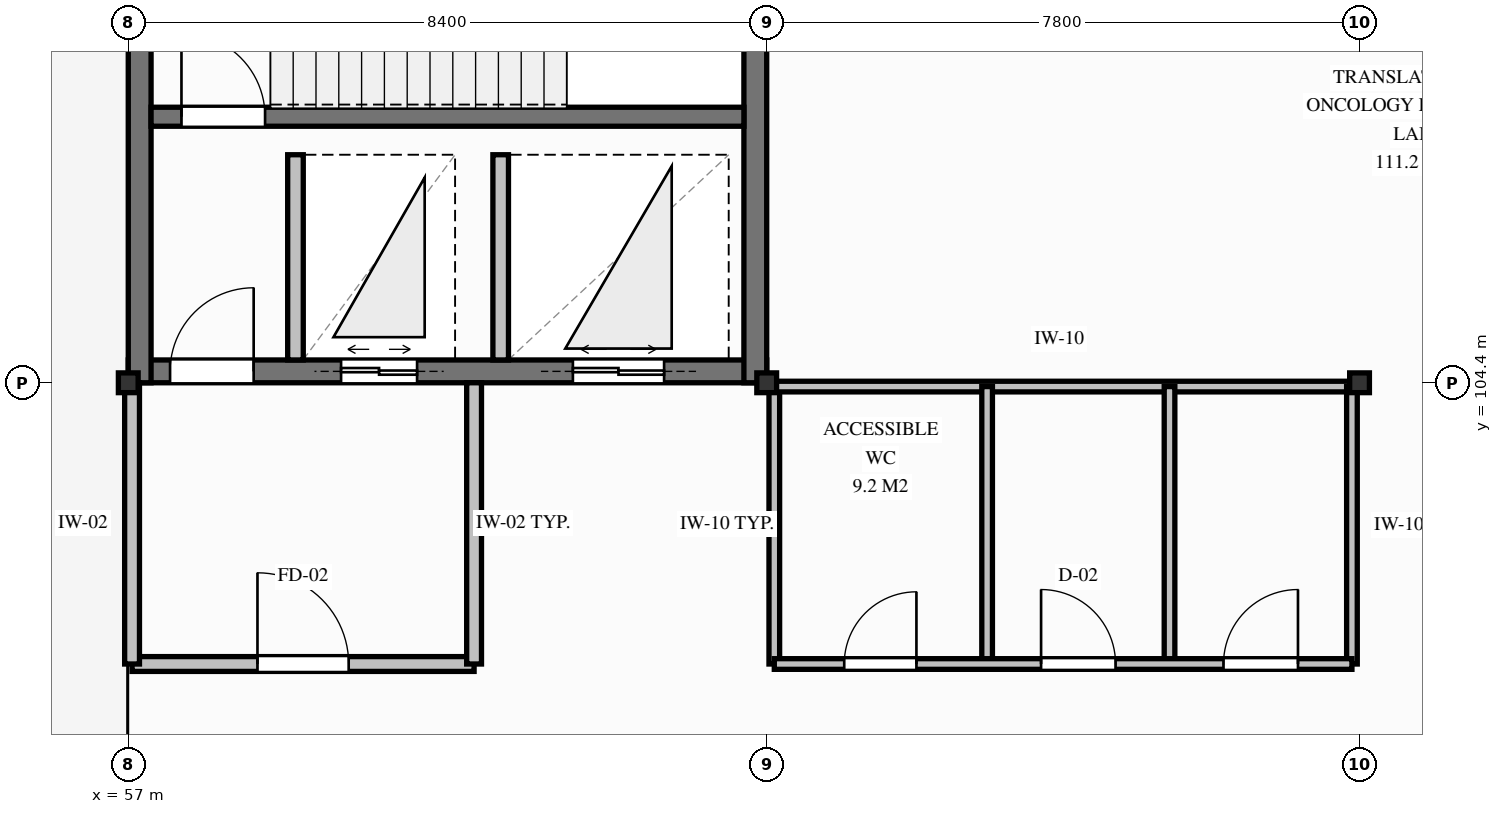
"""IFC4 building model, lengths in metres.
Left out: names, types, materials, properties, quantities, classifications, styles, units other than length and angle.
Written with IfcOpenShell. Run it as: python <this file> out.ifc"""

import sys

from ifc_helpers import new_model, si_unit, direction, frame, frame_2d, origin, origin_2d, place, context, subcontext, project, spatial, rectangle, i_section, extrude, element, fill, save


model = new_model("IFC4")
c1 = context("Model", 3, precision=1e-05, world=origin(), true_north=direction((0.0, 1.0)))
c2 = subcontext(c1, "Body", "Model", "MODEL_VIEW")
j1 = project(units=[si_unit("LENGTHUNIT", "METRE"), si_unit("PLANEANGLEUNIT", "RADIAN")], contexts=[c1])
p1 = place(None, origin())
s1 = spatial("IfcSite", under=j1, at=p1, CompositionType="ELEMENT")
p2 = place(p1, origin())
s2 = spatial("IfcBuilding", under=s1, at=p2, CompositionType="ELEMENT")
p3 = place(p2, frame((0.0, 0.0, 25.35)))
s3 = spatial("IfcBuildingStorey", under=s2, at=p3, CompositionType="ELEMENT", Elevation=25.35)
p4 = place(p3, frame((57.0, 104.55, 0.0), z_axis=(0.0, 0.0, 1.0), x_axis=(1.0, 0.0, 0.0)))
e1 = element("IfcWall", 1, at=p4, inside=s3, PredefinedType="SHEAR", context=c2, shape_type="SweptSolid", body=[
    extrude(rectangle(XDim=8.4, YDim=0.3, at=frame_2d((4.2, 0.0))), origin(), (0.0, 0.0, 1.0), 4.05),
])
p5 = place(p4, frame((0.55, 0.0, 0.0)))
e2 = element("IfcOpeningElement", 2, at=p5, cuts=e1, PredefinedType="OPENING", context=c2, shape_type="SweptSolid", body=[
    extrude(rectangle(XDim=1.1, YDim=2.15, at=frame_2d((0.55, 1.075))), frame((0.0, 0.16, 0.0), z_axis=(0.0, -1.0, 0.0), x_axis=(1.0, 0.0, 0.0)), (0.0, 0.0, 1.0), 0.32),
])
p6 = place(p4, frame((2.8, 0.0, 0.0)))
e3 = element("IfcOpeningElement", 3, at=p6, cuts=e1, PredefinedType="OPENING", context=c2, shape_type="SweptSolid", body=[
    extrude(rectangle(XDim=1.0, YDim=2.1, at=frame_2d((0.5, 1.05))), frame((0.0, 0.16, 0.0), z_axis=(0.0, -1.0, 0.0), x_axis=(1.0, 0.0, 0.0)), (0.0, 0.0, 1.0), 0.32),
])
p7 = place(p4, frame((5.85, 0.0, 0.0)))
e4 = element("IfcOpeningElement", 4, at=p7, cuts=e1, PredefinedType="OPENING", context=c2, shape_type="SweptSolid", body=[
    extrude(rectangle(XDim=1.2, YDim=2.15, at=frame_2d((0.6, 1.075))), frame((0.0, 0.16, 0.0), z_axis=(0.0, -1.0, 0.0), x_axis=(1.0, 0.0, 0.0)), (0.0, 0.0, 1.0), 0.32),
])
for number, where, z_axis, x_axis in (
    (5, (57.15, 104.4, 0.0), (0.0, 0.0, 1.0), (0.0, 1.0, 0.0)),
    (6, (65.25, 104.4, 0.0), (0.0, 0.0, 1.0), (0.0, 1.0, 0.0)),
):
    element("IfcWall", number, at=place(p3, frame(where, z_axis=z_axis, x_axis=x_axis)), inside=s3, PredefinedType="SHEAR", context=c2, shape_type="SweptSolid", body=[
        extrude(rectangle(XDim=7.2, YDim=0.3, at=frame_2d((3.6, 0.0))), origin(), (0.0, 0.0, 1.0), 4.05),
    ])
p8 = place(p3, frame((57.3, 107.9, 0.0), z_axis=(0.0, 0.0, 1.0), x_axis=(1.0, 0.0, 0.0)))
e7 = element("IfcWall", 7, at=p8, inside=s3, PredefinedType="SHEAR", context=c2, shape_type="SweptSolid", body=[
    extrude(rectangle(XDim=7.8, YDim=0.25, at=frame_2d((3.9, 0.0))), origin(), (0.0, 0.0, 1.0), 4.05),
])
p9 = place(p8, frame((0.4, 0.0, 0.0)))
e8 = element("IfcOpeningElement", 8, at=p9, cuts=e7, PredefinedType="OPENING", context=c2, shape_type="SweptSolid", body=[
    extrude(rectangle(XDim=1.1, YDim=2.15, at=frame_2d((0.55, 1.075))), frame((0.0, 0.135, 0.0), z_axis=(0.0, -1.0, 0.0), x_axis=(1.0, 0.0, 0.0)), (0.0, 0.0, 1.0), 0.27),
])
for number, where, z_axis, x_axis in (
    (9, (57.0, 104.4, 0.0), (0.0, 0.0, 1.0), (1.0, 0.0, 0.0)),
    (10, (65.4, 104.4, 0.0), (0.0, 0.0, 1.0), (1.0, 0.0, 0.0)),
    (11, (73.2, 104.4, 0.0), (0.0, 0.0, 1.0), (1.0, 0.0, 0.0)),
):
    element("IfcColumn", number, at=place(p3, frame(where, z_axis=z_axis, x_axis=x_axis)), inside=s3, PredefinedType="COLUMN", context=c2, shape_type="SweptSolid", body=[
        extrude(i_section(OverallWidth=0.26, OverallDepth=0.26, WebThickness=0.01, FlangeThickness=0.018, FilletRadius=0.024, at=origin_2d()), origin(), (0.0, 0.0, 1.0), 4.05),
    ])
for number, where, z_axis, x_axis in (
    (12, (59.2, 104.7, 0.0), (0.0, 0.0, 1.0), (0.0, 1.0, 0.0)),
    (13, (61.9, 104.7, 0.0), (0.0, 0.0, 1.0), (0.0, 1.0, 0.0)),
):
    element("IfcWall", number, at=place(p3, frame(where, z_axis=z_axis, x_axis=x_axis)), inside=s3, PredefinedType="PARTITIONING", context=c2, shape_type="SweptSolid", body=[
        extrude(rectangle(XDim=2.7, YDim=0.205, at=frame_2d((1.35, 0.0))), origin(), (0.0, 0.0, 1.0), 3.78),
    ])
p10 = place(p3, frame((65.5, 100.7, 0.0), z_axis=(0.0, 0.0, 1.0), x_axis=(0.0, 1.0, 0.0)))
e14 = element("IfcWall", 14, at=p10, inside=s3, PredefinedType="PARTITIONING", context=c2, shape_type="SweptSolid", body=[
    extrude(rectangle(XDim=3.68, YDim=0.14, at=frame_2d((1.84, 0.0))), origin(), (0.0, 0.0, 1.0), 3.288),
])
p11 = place(p3, frame((65.4, 104.35, 0.0), z_axis=(0.0, 0.0, 1.0), x_axis=(1.0, 0.0, 0.0)))
e15 = element("IfcWall", 15, at=p11, inside=s3, PredefinedType="PARTITIONING", context=c2, shape_type="SweptSolid", body=[
    extrude(rectangle(XDim=7.7, YDim=0.14, at=frame_2d((3.85, 0.0))), origin(), (0.0, 0.0, 1.0), 3.238),
])
p12 = place(p3, frame((73.1, 100.7, 0.0), z_axis=(0.0, 0.0, 1.0), x_axis=(0.0, 1.0, 0.0)))
e16 = element("IfcWall", 16, at=p12, inside=s3, PredefinedType="PARTITIONING", context=c2, shape_type="SweptSolid", body=[
    extrude(rectangle(XDim=3.65, YDim=0.14, at=frame_2d((1.825, 0.0))), origin(), (0.0, 0.0, 1.0), 3.238),
])
for number, where, z_axis, x_axis in (
    (17, (68.3, 100.7, 0.0), (0.0, 0.0, 1.0), (0.0, 1.0, 0.0)),
    (18, (70.7, 100.7, 0.0), (0.0, 0.0, 1.0), (0.0, 1.0, 0.0)),
):
    element("IfcWall", number, at=place(p3, frame(where, z_axis=z_axis, x_axis=x_axis)), inside=s3, PredefinedType="PARTITIONING", context=c2, shape_type="SweptSolid", body=[
        extrude(rectangle(XDim=3.65, YDim=0.14, at=frame_2d((1.825, 0.0))), origin(), (0.0, 0.0, 1.0), 3.338),
    ])
p13 = place(p3, frame((65.5, 100.7, 0.0), z_axis=(0.0, 0.0, 1.0), x_axis=(1.0, 0.0, 0.0)))
e19 = element("IfcWall", 19, at=p13, inside=s3, PredefinedType="PARTITIONING", context=c2, shape_type="SweptSolid", body=[
    extrude(rectangle(XDim=7.6, YDim=0.14, at=frame_2d((3.8, 0.0))), origin(), (0.0, 0.0, 1.0), 3.488),
])
p14 = place(p13, frame((0.92, 0.0, 0.0)))
e20 = element("IfcOpeningElement", 20, at=p14, cuts=e19, PredefinedType="OPENING", context=c2, shape_type="SweptSolid", body=[
    extrude(rectangle(XDim=0.95, YDim=2.12, at=frame_2d((0.475, 1.06))), frame((0.0, 0.08, 0.0), z_axis=(0.0, -1.0, 0.0), x_axis=(1.0, 0.0, 0.0)), (0.0, 0.0, 1.0), 0.16),
])
p15 = place(p13, frame((3.51, 0.0, 0.0)))
e21 = element("IfcOpeningElement", 21, at=p15, cuts=e19, PredefinedType="OPENING", context=c2, shape_type="SweptSolid", body=[
    extrude(rectangle(XDim=0.98, YDim=2.14, at=frame_2d((0.49, 1.07))), frame((0.0, 0.08, 0.0), z_axis=(0.0, -1.0, 0.0), x_axis=(1.0, 0.0, 0.0)), (0.0, 0.0, 1.0), 0.16),
])
p16 = place(p13, frame((5.91, 0.0, 0.0)))
e22 = element("IfcOpeningElement", 22, at=p16, cuts=e19, PredefinedType="OPENING", context=c2, shape_type="SweptSolid", body=[
    extrude(rectangle(XDim=0.98, YDim=2.14, at=frame_2d((0.49, 1.07))), frame((0.0, 0.08, 0.0), z_axis=(0.0, -1.0, 0.0), x_axis=(1.0, 0.0, 0.0)), (0.0, 0.0, 1.0), 0.16),
])
p17 = place(p3, frame((57.05, 100.7, 0.0), z_axis=(0.0, 0.0, 1.0), x_axis=(1.0, 0.0, 0.0)))
e23 = element("IfcWall", 23, at=p17, inside=s3, PredefinedType="PARTITIONING", context=c2, shape_type="SweptSolid", body=[
    extrude(rectangle(XDim=4.5, YDim=0.195, at=frame_2d((2.25, 0.0))), origin(), (0.0, 0.0, 1.0), 3.388),
])
p18 = place(p17, frame((1.65, 0.0, 0.0)))
e24 = element("IfcOpeningElement", 24, at=p18, cuts=e23, PredefinedType="OPENING", context=c2, shape_type="SweptSolid", body=[
    extrude(rectangle(XDim=1.2, YDim=2.15, at=frame_2d((0.6, 1.075))), frame((0.0, 0.107, 0.0), z_axis=(0.0, -1.0, 0.0), x_axis=(1.0, 0.0, 0.0)), (0.0, 0.0, 1.0), 0.215),
])
for number, where, z_axis, x_axis in (
    (25, (61.55, 100.7, 0.0), (0.0, 0.0, 1.0), (0.0, 1.0, 0.0)),
    (26, (57.05, 100.7, 0.0), (0.0, 0.0, 1.0), (0.0, 1.0, 0.0)),
):
    element("IfcWall", number, at=place(p3, frame(where, z_axis=z_axis, x_axis=x_axis)), inside=s3, PredefinedType="PARTITIONING", context=c2, shape_type="SweptSolid", body=[
        extrude(rectangle(XDim=3.7, YDim=0.195, at=frame_2d((1.85, 0.0))), origin(), (0.0, 0.0, 1.0), 3.288),
    ])
p19 = place(p9, origin())
e27 = element("IfcDoor", 27, at=p19, inside=s3, OperationType="SINGLE_SWING_LEFT", PredefinedType="DOOR", context=c2, shape_type="SweptSolid", body=[
    extrude(rectangle(XDim=1.1, YDim=2.15, at=frame_2d((0.55, 1.075))), frame((0.0, 0.025, 0.0), z_axis=(0.0, -1.0, 0.0), x_axis=(1.0, 0.0, 0.0)), (0.0, 0.0, 1.0), 0.05),
])
fill(e8, e27)
p20 = place(p5, origin())
e28 = element("IfcDoor", 28, at=p20, inside=s3, OperationType="SINGLE_SWING_RIGHT", PredefinedType="DOOR", context=c2, shape_type="SweptSolid", body=[
    extrude(rectangle(XDim=1.1, YDim=2.15, at=frame_2d((0.55, 1.075))), frame((0.0, 0.025, 0.0), z_axis=(0.0, -1.0, 0.0), x_axis=(1.0, 0.0, 0.0)), (0.0, 0.0, 1.0), 0.05),
])
fill(e2, e28)
p21 = place(p6, origin())
e29 = element("IfcDoor", 29, at=p21, inside=s3, OperationType="DOUBLE_DOOR_SLIDING", PredefinedType="DOOR", context=c2, shape_type="SweptSolid", body=[
    extrude(rectangle(XDim=1.0, YDim=2.1, at=frame_2d((0.5, 1.05))), frame((0.0, 0.025, 0.0), z_axis=(0.0, -1.0, 0.0), x_axis=(1.0, 0.0, 0.0)), (0.0, 0.0, 1.0), 0.05),
])
fill(e3, e29)
p22 = place(p7, origin())
e30 = element("IfcDoor", 30, at=p22, inside=s3, OperationType="DOUBLE_DOOR_SLIDING", PredefinedType="DOOR", context=c2, shape_type="SweptSolid", body=[
    extrude(rectangle(XDim=1.2, YDim=2.15, at=frame_2d((0.6, 1.075))), frame((0.0, 0.025, 0.0), z_axis=(0.0, -1.0, 0.0), x_axis=(1.0, 0.0, 0.0)), (0.0, 0.0, 1.0), 0.05),
])
fill(e4, e30)
p23 = place(p14, origin())
e31 = element("IfcDoor", 31, at=p23, inside=s3, OperationType="SINGLE_SWING_RIGHT", PredefinedType="DOOR", context=c2, shape_type="SweptSolid", body=[
    extrude(rectangle(XDim=0.95, YDim=2.12, at=frame_2d((0.475, 1.06))), frame((0.0, 0.025, 0.0), z_axis=(0.0, -1.0, 0.0), x_axis=(1.0, 0.0, 0.0)), (0.0, 0.0, 1.0), 0.05),
])
fill(e20, e31)
p24 = place(p15, origin())
e32 = element("IfcDoor", 32, at=p24, inside=s3, OperationType="SINGLE_SWING_LEFT", PredefinedType="DOOR", context=c2, shape_type="SweptSolid", body=[
    extrude(rectangle(XDim=0.98, YDim=2.14, at=frame_2d((0.49, 1.07))), frame((0.0, 0.025, 0.0), z_axis=(0.0, -1.0, 0.0), x_axis=(1.0, 0.0, 0.0)), (0.0, 0.0, 1.0), 0.05),
])
fill(e21, e32)
p25 = place(p16, origin())
e33 = element("IfcDoor", 33, at=p25, inside=s3, OperationType="SINGLE_SWING_RIGHT", PredefinedType="DOOR", context=c2, shape_type="SweptSolid", body=[
    extrude(rectangle(XDim=0.98, YDim=2.14, at=frame_2d((0.49, 1.07))), frame((0.0, 0.025, 0.0), z_axis=(0.0, -1.0, 0.0), x_axis=(1.0, 0.0, 0.0)), (0.0, 0.0, 1.0), 0.05),
])
fill(e22, e33)
p26 = place(p18, origin())
e34 = element("IfcDoor", 34, at=p26, inside=s3, OperationType="SINGLE_SWING_LEFT", PredefinedType="DOOR", context=c2, shape_type="SweptSolid", body=[
    extrude(rectangle(XDim=1.2, YDim=2.15, at=frame_2d((0.6, 1.075))), frame((0.0, 0.025, 0.0), z_axis=(0.0, -1.0, 0.0), x_axis=(1.0, 0.0, 0.0)), (0.0, 0.0, 1.0), 0.05),
])
fill(e24, e34)
save(model, sys.argv[1])
